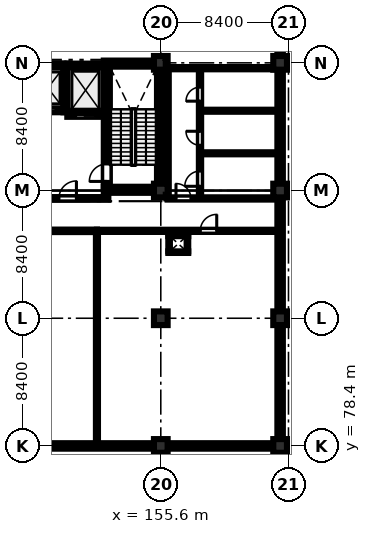
"""IFC4 building model, lengths in metres.
Left out: names, types, materials, properties, quantities, classifications, styles, units other than length and angle.
Written with IfcOpenShell. Run it as: python <this file> out.ifc"""

import sys

from ifc_helpers import new_model, si_unit, direction, frame, frame_2d, origin, origin_2d, place, context, subcontext, project, spatial, rectangle, extrude, element, fill, save


model = new_model("IFC4")
c1 = context("Model", 3, precision=1e-05, world=origin(), true_north=direction((0.0, 1.0)))
c2 = subcontext(c1, "Body", "Model", "MODEL_VIEW")
j1 = project(units=[si_unit("LENGTHUNIT", "METRE"), si_unit("PLANEANGLEUNIT", "RADIAN")], contexts=[c1])
p1 = place(None, origin())
s1 = spatial("IfcSite", under=j1, at=p1, CompositionType="ELEMENT")
p2 = place(p1, origin())
s2 = spatial("IfcBuilding", under=s1, at=p2, CompositionType="ELEMENT")
p3 = place(p2, frame((0.0, 0.0, 10.2)))
s3 = spatial("IfcBuildingStorey", under=s2, at=p3, CompositionType="ELEMENT", Elevation=10.2)
for number, where, z_axis, x_axis in (
    (1, (155.6, 78.4, 0.0), (0.0, 0.0, 1.0), (1.0, 0.0, 0.0)),
    (2, (155.6, 86.8, 0.0), (0.0, 0.0, 1.0), (1.0, 0.0, 0.0)),
    (3, (155.6, 95.2, 0.0), (0.0, 0.0, 1.0), (1.0, 0.0, 0.0)),
    (4, (155.6, 103.6, 0.0), (0.0, 0.0, 1.0), (1.0, 0.0, 0.0)),
    (5, (163.45, 78.4, 0.0), (0.0, 0.0, 1.0), (1.0, 0.0, 0.0)),
    (6, (163.45, 86.8, 0.0), (0.0, 0.0, 1.0), (1.0, 0.0, 0.0)),
    (7, (163.45, 95.2, 0.0), (0.0, 0.0, 1.0), (1.0, 0.0, 0.0)),
    (8, (163.45, 103.6, 0.0), (0.0, 0.0, 1.0), (1.0, 0.0, 0.0)),
):
    element("IfcColumn", number, at=place(p3, frame(where, z_axis=z_axis, x_axis=x_axis)), inside=s3, PredefinedType="COLUMN", context=c2, shape_type="SweptSolid", body=[
        extrude(rectangle(XDim=0.9, YDim=0.9, at=origin_2d()), origin(), (0.0, 0.0, 1.0), 4.26),
    ])
for number, where, z_axis, x_axis in (
    (9, (151.85, 95.25, 0.0), (0.0, 0.0, 1.0), (1.0, 0.0, 0.0)),
    (10, (151.85, 103.55, 0.0), (0.0, 0.0, 1.0), (1.0, 0.0, 0.0)),
):
    element("IfcWall", number, at=place(p3, frame(where, z_axis=z_axis, x_axis=x_axis)), inside=s3, PredefinedType="SHEAR", context=c2, shape_type="SweptSolid", body=[
        extrude(rectangle(XDim=3.9, YDim=0.4, at=frame_2d((1.95, 0.0))), origin(), (0.0, 0.0, 1.0), 4.26),
    ])
p4 = place(p3, frame((152.05, 95.45, 0.0), z_axis=(0.0, 0.0, 1.0), x_axis=(0.0, 1.0, 0.0)))
e11 = element("IfcWall", 11, at=p4, inside=s3, PredefinedType="SHEAR", context=c2, shape_type="SweptSolid", body=[
    extrude(rectangle(XDim=7.9, YDim=0.4, at=frame_2d((3.95, 0.0))), origin(), (0.0, 0.0, 1.0), 4.26),
])
p5 = place(p4, frame((0.35, 0.0, 0.0)))
e12 = element("IfcOpeningElement", 12, at=p5, cuts=e11, PredefinedType="OPENING", context=c2, shape_type="SweptSolid", body=[
    extrude(rectangle(XDim=1.15, YDim=2.15, at=frame_2d((0.575, 1.075))), frame((0.0, 0.21, 0.0), z_axis=(0.0, -1.0, 0.0), x_axis=(1.0, 0.0, 0.0)), (0.0, 0.0, 1.0), 0.42),
])
p6 = place(p3, frame((155.55, 95.45, 0.0), z_axis=(0.0, 0.0, 1.0), x_axis=(0.0, 1.0, 0.0)))
e13 = element("IfcWall", 13, at=p6, inside=s3, PredefinedType="SHEAR", context=c2, shape_type="SweptSolid", body=[
    extrude(rectangle(XDim=7.9, YDim=0.4, at=frame_2d((3.95, 0.0))), origin(), (0.0, 0.0, 1.0), 4.26),
])
p7 = place(p3, frame((147.15, 100.475, 0.0), z_axis=(0.0, 0.0, 1.0), x_axis=(1.0, 0.0, 0.0)))
e14 = element("IfcWall", 14, at=p7, inside=s3, PredefinedType="SHEAR", context=c2, shape_type="SweptSolid", body=[
    extrude(rectangle(XDim=2.05, YDim=0.25, at=frame_2d((1.025, 0.0))), origin(), (0.0, 0.0, 1.0), 4.26),
])
p8 = place(p7, frame((0.495, 0.0, 0.0)))
e15 = element("IfcOpeningElement", 15, at=p8, cuts=e14, PredefinedType="OPENING", context=c2, shape_type="SweptSolid", body=[
    extrude(rectangle(XDim=1.06, YDim=2.15, at=frame_2d((0.53, 1.075))), frame((0.0, 0.135, 0.0), z_axis=(0.0, -1.0, 0.0), x_axis=(1.0, 0.0, 0.0)), (0.0, 0.0, 1.0), 0.27),
])
p9 = place(p3, frame((147.15, 103.425, 0.0), z_axis=(0.0, 0.0, 1.0), x_axis=(1.0, 0.0, 0.0)))
e16 = element("IfcWall", 16, at=p9, inside=s3, PredefinedType="SHEAR", context=c2, shape_type="SweptSolid", body=[
    extrude(rectangle(XDim=2.05, YDim=0.25, at=frame_2d((1.025, 0.0))), origin(), (0.0, 0.0, 1.0), 4.26),
])
p10 = place(p3, frame((149.325, 100.35, 0.0), z_axis=(0.0, 0.0, 1.0), x_axis=(0.0, 1.0, 0.0)))
e17 = element("IfcWall", 17, at=p10, inside=s3, PredefinedType="SHEAR", context=c2, shape_type="SweptSolid", body=[
    extrude(rectangle(XDim=3.2, YDim=0.25, at=frame_2d((1.6, 0.0))), origin(), (0.0, 0.0, 1.0), 4.26),
])
p11 = place(p3, frame((149.45, 100.175, 0.0), z_axis=(0.0, 0.0, 1.0), x_axis=(1.0, 0.0, 0.0)))
e18 = element("IfcWall", 18, at=p11, inside=s3, PredefinedType="SHEAR", context=c2, shape_type="SweptSolid", body=[
    extrude(rectangle(XDim=2.4, YDim=0.25, at=frame_2d((1.2, 0.0))), origin(), (0.0, 0.0, 1.0), 4.26),
])
p12 = place(p11, frame((0.55, 0.0, 0.0)))
e19 = element("IfcOpeningElement", 19, at=p12, cuts=e18, PredefinedType="OPENING", context=c2, shape_type="SweptSolid", body=[
    extrude(rectangle(XDim=1.3, YDim=2.25, at=frame_2d((0.65, 1.125))), frame((0.0, 0.135, 0.0), z_axis=(0.0, -1.0, 0.0), x_axis=(1.0, 0.0, 0.0)), (0.0, 0.0, 1.0), 0.27),
])
p13 = place(p3, frame((149.45, 103.425, 0.0), z_axis=(0.0, 0.0, 1.0), x_axis=(1.0, 0.0, 0.0)))
e20 = element("IfcWall", 20, at=p13, inside=s3, PredefinedType="SHEAR", context=c2, shape_type="SweptSolid", body=[
    extrude(rectangle(XDim=2.4, YDim=0.25, at=frame_2d((1.2, 0.0))), origin(), (0.0, 0.0, 1.0), 4.26),
])
p14 = place(p3, frame((155.15, 78.4, 0.0), z_axis=(0.0, 0.0, 1.0), x_axis=(-1.0, 0.0, 0.0)))
e21 = element("IfcWall", 21, at=p14, inside=s3, PredefinedType="STANDARD", context=c2, shape_type="SweptSolid", body=[
    extrude(rectangle(XDim=7.5, YDim=0.36, at=frame_2d((3.75, 0.0))), origin(), (0.0, 0.0, 1.0), 3.16),
])
p15 = place(p14, frame((1.15, 0.0, 0.95)))
e22 = element("IfcOpeningElement", 22, at=p15, cuts=e21, PredefinedType="OPENING", context=c2, shape_type="SweptSolid", body=[
    extrude(rectangle(XDim=1.5, YDim=1.5, at=frame_2d((0.75, 0.75))), frame((0.0, 0.19, 0.0), z_axis=(0.0, -1.0, 0.0), x_axis=(1.0, 0.0, 0.0)), (0.0, 0.0, 1.0), 0.38),
])
p16 = place(p3, frame((163.0, 78.4, 0.0), z_axis=(0.0, 0.0, 1.0), x_axis=(-1.0, 0.0, 0.0)))
e23 = element("IfcWall", 23, at=p16, inside=s3, PredefinedType="STANDARD", context=c2, shape_type="SweptSolid", body=[
    extrude(rectangle(XDim=6.95, YDim=0.36, at=frame_2d((3.475, 0.0))), origin(), (0.0, 0.0, 1.0), 3.16),
])
p17 = place(p16, frame((1.15, 0.0, 0.95)))
e24 = element("IfcOpeningElement", 24, at=p17, cuts=e23, PredefinedType="OPENING", context=c2, shape_type="SweptSolid", body=[
    extrude(rectangle(XDim=1.5, YDim=1.5, at=frame_2d((0.75, 0.75))), frame((0.0, 0.19, 0.0), z_axis=(0.0, -1.0, 0.0), x_axis=(1.0, 0.0, 0.0)), (0.0, 0.0, 1.0), 0.38),
])
p18 = place(p3, frame((163.45, 86.35, 0.0), z_axis=(0.0, 0.0, 1.0), x_axis=(0.0, -1.0, 0.0)))
e25 = element("IfcWall", 25, at=p18, inside=s3, PredefinedType="STANDARD", context=c2, shape_type="SweptSolid", body=[
    extrude(rectangle(XDim=7.5, YDim=0.36, at=frame_2d((3.75, 0.0))), origin(), (0.0, 0.0, 1.0), 3.51),
])
p19 = place(p18, frame((1.15, 0.0, 1.1)))
e26 = element("IfcOpeningElement", 26, at=p19, cuts=e25, PredefinedType="OPENING", context=c2, shape_type="SweptSolid", body=[
    extrude(rectangle(XDim=1.8, YDim=1.8, at=frame_2d((0.9, 0.9))), frame((0.0, 0.19, 0.0), z_axis=(0.0, -1.0, 0.0), x_axis=(1.0, 0.0, 0.0)), (0.0, 0.0, 1.0), 0.38),
])
p20 = place(p3, frame((163.45, 94.75, 0.0), z_axis=(0.0, 0.0, 1.0), x_axis=(0.0, -1.0, 0.0)))
e27 = element("IfcWall", 27, at=p20, inside=s3, PredefinedType="STANDARD", context=c2, shape_type="SweptSolid", body=[
    extrude(rectangle(XDim=7.5, YDim=0.36, at=frame_2d((3.75, 0.0))), origin(), (0.0, 0.0, 1.0), 3.51),
])
p21 = place(p20, frame((4.2, 0.0, 1.1)))
e28 = element("IfcOpeningElement", 28, at=p21, cuts=e27, PredefinedType="OPENING", context=c2, shape_type="SweptSolid", body=[
    extrude(rectangle(XDim=1.8, YDim=1.8, at=frame_2d((0.9, 0.9))), frame((0.0, 0.19, 0.0), z_axis=(0.0, -1.0, 0.0), x_axis=(1.0, 0.0, 0.0)), (0.0, 0.0, 1.0), 0.38),
])
p22 = place(p3, frame((163.45, 103.15, 0.0), z_axis=(0.0, 0.0, 1.0), x_axis=(0.0, -1.0, 0.0)))
e29 = element("IfcWall", 29, at=p22, inside=s3, PredefinedType="STANDARD", context=c2, shape_type="SweptSolid", body=[
    extrude(rectangle(XDim=7.5, YDim=0.36, at=frame_2d((3.75, 0.0))), origin(), (0.0, 0.0, 1.0), 3.51),
])
p23 = place(p22, frame((1.15, 0.0, 1.1)))
e30 = element("IfcOpeningElement", 30, at=p23, cuts=e29, PredefinedType="OPENING", context=c2, shape_type="SweptSolid", body=[
    extrude(rectangle(XDim=1.4, YDim=1.4, at=frame_2d((0.7, 0.7))), frame((0.0, 0.19, 0.0), z_axis=(0.0, -1.0, 0.0), x_axis=(1.0, 0.0, 0.0)), (0.0, 0.0, 1.0), 0.38),
])
p24 = place(p3, frame((163.45, 111.0, 0.0), z_axis=(0.0, 0.0, 1.0), x_axis=(0.0, -1.0, 0.0)))
e31 = element("IfcWall", 31, at=p24, inside=s3, PredefinedType="STANDARD", context=c2, shape_type="SweptSolid", body=[
    extrude(rectangle(XDim=6.95, YDim=0.36, at=frame_2d((3.475, 0.0))), origin(), (0.0, 0.0, 1.0), 3.51),
])
p25 = place(p24, frame((1.15, 0.0, 1.1)))
e32 = element("IfcOpeningElement", 32, at=p25, cuts=e31, PredefinedType="OPENING", context=c2, shape_type="SweptSolid", body=[
    extrude(rectangle(XDim=1.8, YDim=1.8, at=frame_2d((0.9, 0.9))), frame((0.0, 0.19, 0.0), z_axis=(0.0, -1.0, 0.0), x_axis=(1.0, 0.0, 0.0)), (0.0, 0.0, 1.0), 0.38),
])
p26 = place(p3, frame((147.3, 94.68, 0.0), z_axis=(0.0, 0.0, 1.0), x_axis=(1.0, 0.0, 0.0)))
e33 = element("IfcWall", 33, at=p26, inside=s3, PredefinedType="STANDARD", context=c2, shape_type="SweptSolid", body=[
    extrude(rectangle(XDim=4.85, YDim=0.18, at=frame_2d((2.425, 0.0))), origin(), (0.0, 0.0, 1.0), 4.26),
])
p27 = place(p26, frame((1.6, 0.0, 0.0)))
e34 = element("IfcOpeningElement", 34, at=p27, cuts=e33, PredefinedType="OPENING", context=c2, shape_type="SweptSolid", body=[
    extrude(rectangle(XDim=1.15, YDim=2.15, at=frame_2d((0.575, 1.075))), frame((0.0, 0.1, 0.0), z_axis=(0.0, -1.0, 0.0), x_axis=(1.0, 0.0, 0.0)), (0.0, 0.0, 1.0), 0.2),
])
p28 = place(p3, frame((156.05, 94.68, 0.0), z_axis=(0.0, 0.0, 1.0), x_axis=(1.0, 0.0, 0.0)))
e35 = element("IfcWall", 35, at=p28, inside=s3, PredefinedType="PARTITIONING", context=c2, shape_type="SweptSolid", body=[
    extrude(rectangle(XDim=7.15, YDim=0.15, at=frame_2d((3.575, 0.0))), origin(), (0.0, 0.0, 1.0), 4.26),
])
p29 = place(p28, frame((0.55, 0.0, 0.0)))
e36 = element("IfcOpeningElement", 36, at=p29, cuts=e35, PredefinedType="OPENING", context=c2, shape_type="SweptSolid", body=[
    extrude(rectangle(XDim=0.98, YDim=2.12, at=frame_2d((0.49, 1.06))), frame((0.0, 0.085, 0.0), z_axis=(0.0, -1.0, 0.0), x_axis=(1.0, 0.0, 0.0)), (0.0, 0.0, 1.0), 0.17),
])
p30 = place(p3, frame((158.18, 94.68, 0.0), z_axis=(0.0, 0.0, 1.0), x_axis=(0.0, 1.0, 0.0)))
e37 = element("IfcWall", 37, at=p30, inside=s3, PredefinedType="PARTITIONING", context=c2, shape_type="SweptSolid", body=[
    extrude(rectangle(XDim=8.57, YDim=0.15, at=frame_2d((4.285, 0.0))), origin(), (0.0, 0.0, 1.0), 4.26),
])
p31 = place(p30, frame((0.8, 0.0, 0.0)))
e38 = element("IfcOpeningElement", 38, at=p31, cuts=e37, PredefinedType="OPENING", context=c2, shape_type="SweptSolid", body=[
    extrude(rectangle(XDim=1.0, YDim=2.12, at=frame_2d((0.5, 1.06))), frame((0.0, 0.085, 0.0), z_axis=(0.0, -1.0, 0.0), x_axis=(1.0, 0.0, 0.0)), (0.0, 0.0, 1.0), 0.17),
])
p32 = place(p30, frame((3.5, 0.0, 0.0)))
e39 = element("IfcOpeningElement", 39, at=p32, cuts=e37, PredefinedType="OPENING", context=c2, shape_type="SweptSolid", body=[
    extrude(rectangle(XDim=0.92, YDim=2.1, at=frame_2d((0.46, 1.05))), frame((0.0, 0.085, 0.0), z_axis=(0.0, -1.0, 0.0), x_axis=(1.0, 0.0, 0.0)), (0.0, 0.0, 1.0), 0.17),
])
p33 = place(p30, frame((6.4, 0.0, 0.0)))
e40 = element("IfcOpeningElement", 40, at=p33, cuts=e37, PredefinedType="OPENING", context=c2, shape_type="SweptSolid", body=[
    extrude(rectangle(XDim=0.92, YDim=2.1, at=frame_2d((0.46, 1.05))), frame((0.0, 0.085, 0.0), z_axis=(0.0, -1.0, 0.0), x_axis=(1.0, 0.0, 0.0)), (0.0, 0.0, 1.0), 0.17),
])
for number, where, z_axis, x_axis in (
    (41, (158.18, 97.65, 0.0), (0.0, 0.0, 1.0), (1.0, 0.0, 0.0)),
    (42, (158.18, 100.45, 0.0), (0.0, 0.0, 1.0), (1.0, 0.0, 0.0)),
):
    element("IfcWall", number, at=place(p3, frame(where, z_axis=z_axis, x_axis=x_axis)), inside=s3, PredefinedType="PARTITIONING", context=c2, shape_type="SweptSolid", body=[
        extrude(rectangle(XDim=5.02, YDim=0.135, at=frame_2d((2.51, 0.0))), origin(), (0.0, 0.0, 1.0), 4.26),
    ])
p34 = place(p3, frame((156.05, 103.25, 0.0), z_axis=(0.0, 0.0, 1.0), x_axis=(1.0, 0.0, 0.0)))
e43 = element("IfcWall", 43, at=p34, inside=s3, PredefinedType="PARTITIONING", context=c2, shape_type="SweptSolid", body=[
    extrude(rectangle(XDim=7.15, YDim=0.15, at=frame_2d((3.575, 0.0))), origin(), (0.0, 0.0, 1.0), 4.26),
])
p35 = place(p3, frame((156.05, 94.68, 0.0), z_axis=(0.0, 0.0, 1.0), x_axis=(0.0, 1.0, 0.0)))
e44 = element("IfcWall", 44, at=p35, inside=s3, PredefinedType="PARTITIONING", context=c2, shape_type="SweptSolid", body=[
    extrude(rectangle(XDim=8.57, YDim=0.15, at=frame_2d((4.285, 0.0))), origin(), (0.0, 0.0, 1.0), 4.26),
])
p36 = place(p3, frame((138.8, 92.55, 0.0), z_axis=(0.0, 0.0, 1.0), x_axis=(1.0, 0.0, 0.0)))
e45 = element("IfcWall", 45, at=p36, inside=s3, PredefinedType="PARTITIONING", context=c2, shape_type="SweptSolid", body=[
    extrude(rectangle(XDim=12.6, YDim=0.165, at=frame_2d((6.3, 0.0))), origin(), (0.0, 0.0, 1.0), 4.26),
])
p37 = place(p36, frame((3.4, 0.0, 0.0)))
e46 = element("IfcOpeningElement", 46, at=p37, cuts=e45, PredefinedType="OPENING", context=c2, shape_type="SweptSolid", body=[
    extrude(rectangle(XDim=1.02, YDim=2.15, at=frame_2d((0.51, 1.075))), frame((0.0, 0.093, 0.0), z_axis=(0.0, -1.0, 0.0), x_axis=(1.0, 0.0, 0.0)), (0.0, 0.0, 1.0), 0.185),
])
p38 = place(p3, frame((151.4, 92.55, 0.0), z_axis=(0.0, 0.0, 1.0), x_axis=(1.0, 0.0, 0.0)))
e47 = element("IfcWall", 47, at=p38, inside=s3, PredefinedType="PARTITIONING", context=c2, shape_type="SweptSolid", body=[
    extrude(rectangle(XDim=11.95, YDim=0.145, at=frame_2d((5.975, 0.0))), origin(), (0.0, 0.0, 1.0), 4.26),
])
p39 = place(p38, frame((6.8, 0.0, 0.0)))
e48 = element("IfcOpeningElement", 48, at=p39, cuts=e47, PredefinedType="OPENING", context=c2, shape_type="SweptSolid", body=[
    extrude(rectangle(XDim=1.08, YDim=2.15, at=frame_2d((0.54, 1.075))), frame((0.0, 0.083, 0.0), z_axis=(0.0, -1.0, 0.0), x_axis=(1.0, 0.0, 0.0)), (0.0, 0.0, 1.0), 0.165),
])
p40 = place(p3, frame((151.4, 78.55, 0.0), z_axis=(0.0, 0.0, 1.0), x_axis=(0.0, 1.0, 0.0)))
e49 = element("IfcWall", 49, at=p40, inside=s3, PredefinedType="PARTITIONING", context=c2, shape_type="SweptSolid", body=[
    extrude(rectangle(XDim=14.0, YDim=0.135, at=frame_2d((7.0, 0.0))), origin(), (0.0, 0.0, 1.0), 3.71),
])
for number, where, z_axis, x_axis in (
    (50, (156.095, 91.147, 0.0), (0.0, 0.0, 1.0), (1.0, 0.0, 0.0)),
    (51, (156.095, 92.252, 0.0), (0.0, 0.0, 1.0), (1.0, 0.0, 0.0)),
):
    element("IfcWall", number, at=place(p3, frame(where, z_axis=z_axis, x_axis=x_axis)), inside=s3, PredefinedType="PARTITIONING", context=c2, shape_type="SweptSolid", body=[
        extrude(rectangle(XDim=1.31, YDim=0.105, at=frame_2d((0.655, 0.0))), origin(), (0.0, 0.0, 1.0), 4.26),
    ])
for number, where, z_axis, x_axis in (
    (52, (156.147, 91.2, 0.0), (0.0, 0.0, 1.0), (0.0, 1.0, 0.0)),
    (53, (157.353, 91.2, 0.0), (0.0, 0.0, 1.0), (0.0, 1.0, 0.0)),
):
    element("IfcWall", number, at=place(p3, frame(where, z_axis=z_axis, x_axis=x_axis)), inside=s3, PredefinedType="PARTITIONING", context=c2, shape_type="SweptSolid", body=[
        extrude(rectangle(XDim=1.0, YDim=0.105, at=frame_2d((0.5, 0.0))), origin(), (0.0, 0.0, 1.0), 4.26),
    ])
p41 = place(p15, origin())
e54 = element("IfcWindow", 54, at=p41, inside=s3, PartitioningType="DOUBLE_PANEL_VERTICAL", PredefinedType="WINDOW", context=c2, shape_type="SweptSolid", body=[
    extrude(rectangle(XDim=1.5, YDim=1.5, at=frame_2d((0.75, 0.75))), frame((0.0, 0.03, 0.0), z_axis=(0.0, -1.0, 0.0), x_axis=(1.0, 0.0, 0.0)), (0.0, 0.0, 1.0), 0.06),
])
fill(e22, e54)
p42 = place(p17, origin())
e55 = element("IfcWindow", 55, at=p42, inside=s3, PartitioningType="DOUBLE_PANEL_VERTICAL", PredefinedType="WINDOW", context=c2, shape_type="SweptSolid", body=[
    extrude(rectangle(XDim=1.5, YDim=1.5, at=frame_2d((0.75, 0.75))), frame((0.0, 0.03, 0.0), z_axis=(0.0, -1.0, 0.0), x_axis=(1.0, 0.0, 0.0)), (0.0, 0.0, 1.0), 0.06),
])
fill(e24, e55)
p43 = place(p19, origin())
e56 = element("IfcWindow", 56, at=p43, inside=s3, PartitioningType="DOUBLE_PANEL_VERTICAL", PredefinedType="WINDOW", context=c2, shape_type="SweptSolid", body=[
    extrude(rectangle(XDim=1.8, YDim=1.8, at=frame_2d((0.9, 0.9))), frame((0.0, 0.03, 0.0), z_axis=(0.0, -1.0, 0.0), x_axis=(1.0, 0.0, 0.0)), (0.0, 0.0, 1.0), 0.06),
])
fill(e26, e56)
p44 = place(p21, origin())
e57 = element("IfcWindow", 57, at=p44, inside=s3, PartitioningType="DOUBLE_PANEL_VERTICAL", PredefinedType="WINDOW", context=c2, shape_type="SweptSolid", body=[
    extrude(rectangle(XDim=1.8, YDim=1.8, at=frame_2d((0.9, 0.9))), frame((0.0, 0.03, 0.0), z_axis=(0.0, -1.0, 0.0), x_axis=(1.0, 0.0, 0.0)), (0.0, 0.0, 1.0), 0.06),
])
fill(e28, e57)
p45 = place(p23, origin())
e58 = element("IfcWindow", 58, at=p45, inside=s3, PartitioningType="SINGLE_PANEL", PredefinedType="WINDOW", context=c2, shape_type="SweptSolid", body=[
    extrude(rectangle(XDim=1.4, YDim=1.4, at=frame_2d((0.7, 0.7))), frame((0.0, 0.03, 0.0), z_axis=(0.0, -1.0, 0.0), x_axis=(1.0, 0.0, 0.0)), (0.0, 0.0, 1.0), 0.06),
])
fill(e30, e58)
p46 = place(p27, origin())
e59 = element("IfcDoor", 59, at=p46, inside=s3, OperationType="SINGLE_SWING_RIGHT", PredefinedType="DOOR", context=c2, shape_type="SweptSolid", body=[
    extrude(rectangle(XDim=1.15, YDim=2.15, at=frame_2d((0.575, 1.075))), frame((0.0, 0.025, 0.0), z_axis=(0.0, -1.0, 0.0), x_axis=(1.0, 0.0, 0.0)), (0.0, 0.0, 1.0), 0.05),
])
fill(e34, e59)
p47 = place(p29, origin())
e60 = element("IfcDoor", 60, at=p47, inside=s3, OperationType="SINGLE_SWING_LEFT", PredefinedType="DOOR", context=c2, shape_type="SweptSolid", body=[
    extrude(rectangle(XDim=0.98, YDim=2.12, at=frame_2d((0.49, 1.06))), frame((0.0, 0.025, 0.0), z_axis=(0.0, -1.0, 0.0), x_axis=(1.0, 0.0, 0.0)), (0.0, 0.0, 1.0), 0.05),
])
fill(e36, e60)
p48 = place(p31, origin())
e61 = element("IfcDoor", 61, at=p48, inside=s3, OperationType="SINGLE_SWING_LEFT", PredefinedType="DOOR", context=c2, shape_type="SweptSolid", body=[
    extrude(rectangle(XDim=1.0, YDim=2.12, at=frame_2d((0.5, 1.06))), frame((0.0, 0.025, 0.0), z_axis=(0.0, -1.0, 0.0), x_axis=(1.0, 0.0, 0.0)), (0.0, 0.0, 1.0), 0.05),
])
fill(e38, e61)
p49 = place(p32, origin())
e62 = element("IfcDoor", 62, at=p49, inside=s3, OperationType="SINGLE_SWING_RIGHT", PredefinedType="DOOR", context=c2, shape_type="SweptSolid", body=[
    extrude(rectangle(XDim=0.92, YDim=2.1, at=frame_2d((0.46, 1.05))), frame((0.0, 0.025, 0.0), z_axis=(0.0, -1.0, 0.0), x_axis=(1.0, 0.0, 0.0)), (0.0, 0.0, 1.0), 0.05),
])
fill(e39, e62)
p50 = place(p33, origin())
e63 = element("IfcDoor", 63, at=p50, inside=s3, OperationType="SINGLE_SWING_LEFT", PredefinedType="DOOR", context=c2, shape_type="SweptSolid", body=[
    extrude(rectangle(XDim=0.92, YDim=2.1, at=frame_2d((0.46, 1.05))), frame((0.0, 0.025, 0.0), z_axis=(0.0, -1.0, 0.0), x_axis=(1.0, 0.0, 0.0)), (0.0, 0.0, 1.0), 0.05),
])
fill(e40, e63)
p51 = place(p39, origin())
e64 = element("IfcDoor", 64, at=p51, inside=s3, OperationType="SINGLE_SWING_RIGHT", PredefinedType="DOOR", context=c2, shape_type="SweptSolid", body=[
    extrude(rectangle(XDim=1.08, YDim=2.15, at=frame_2d((0.54, 1.075))), frame((0.0, 0.025, 0.0), z_axis=(0.0, -1.0, 0.0), x_axis=(1.0, 0.0, 0.0)), (0.0, 0.0, 1.0), 0.05),
])
fill(e48, e64)
p52 = place(p5, origin())
e65 = element("IfcDoor", 65, at=p52, inside=s3, OperationType="SINGLE_SWING_LEFT", PredefinedType="DOOR", context=c2, shape_type="SweptSolid", body=[
    extrude(rectangle(XDim=1.15, YDim=2.15, at=frame_2d((0.575, 1.075))), frame((0.0, 0.025, 0.0), z_axis=(0.0, -1.0, 0.0), x_axis=(1.0, 0.0, 0.0)), (0.0, 0.0, 1.0), 0.05),
])
fill(e12, e65)
p53 = place(p8, origin())
e66 = element("IfcDoor", 66, at=p53, inside=s3, OperationType="SLIDING_TO_LEFT", PredefinedType="DOOR", context=c2, shape_type="SweptSolid", body=[
    extrude(rectangle(XDim=1.06, YDim=2.15, at=frame_2d((0.53, 1.075))), frame((0.0, 0.025, 0.0), z_axis=(0.0, -1.0, 0.0), x_axis=(1.0, 0.0, 0.0)), (0.0, 0.0, 1.0), 0.05),
])
fill(e15, e66)
p54 = place(p12, origin())
e67 = element("IfcDoor", 67, at=p54, inside=s3, OperationType="SLIDING_TO_LEFT", PredefinedType="DOOR", context=c2, shape_type="SweptSolid", body=[
    extrude(rectangle(XDim=1.3, YDim=2.25, at=frame_2d((0.65, 1.125))), frame((0.0, 0.025, 0.0), z_axis=(0.0, -1.0, 0.0), x_axis=(1.0, 0.0, 0.0)), (0.0, 0.0, 1.0), 0.05),
])
fill(e19, e67)
save(model, sys.argv[1])
